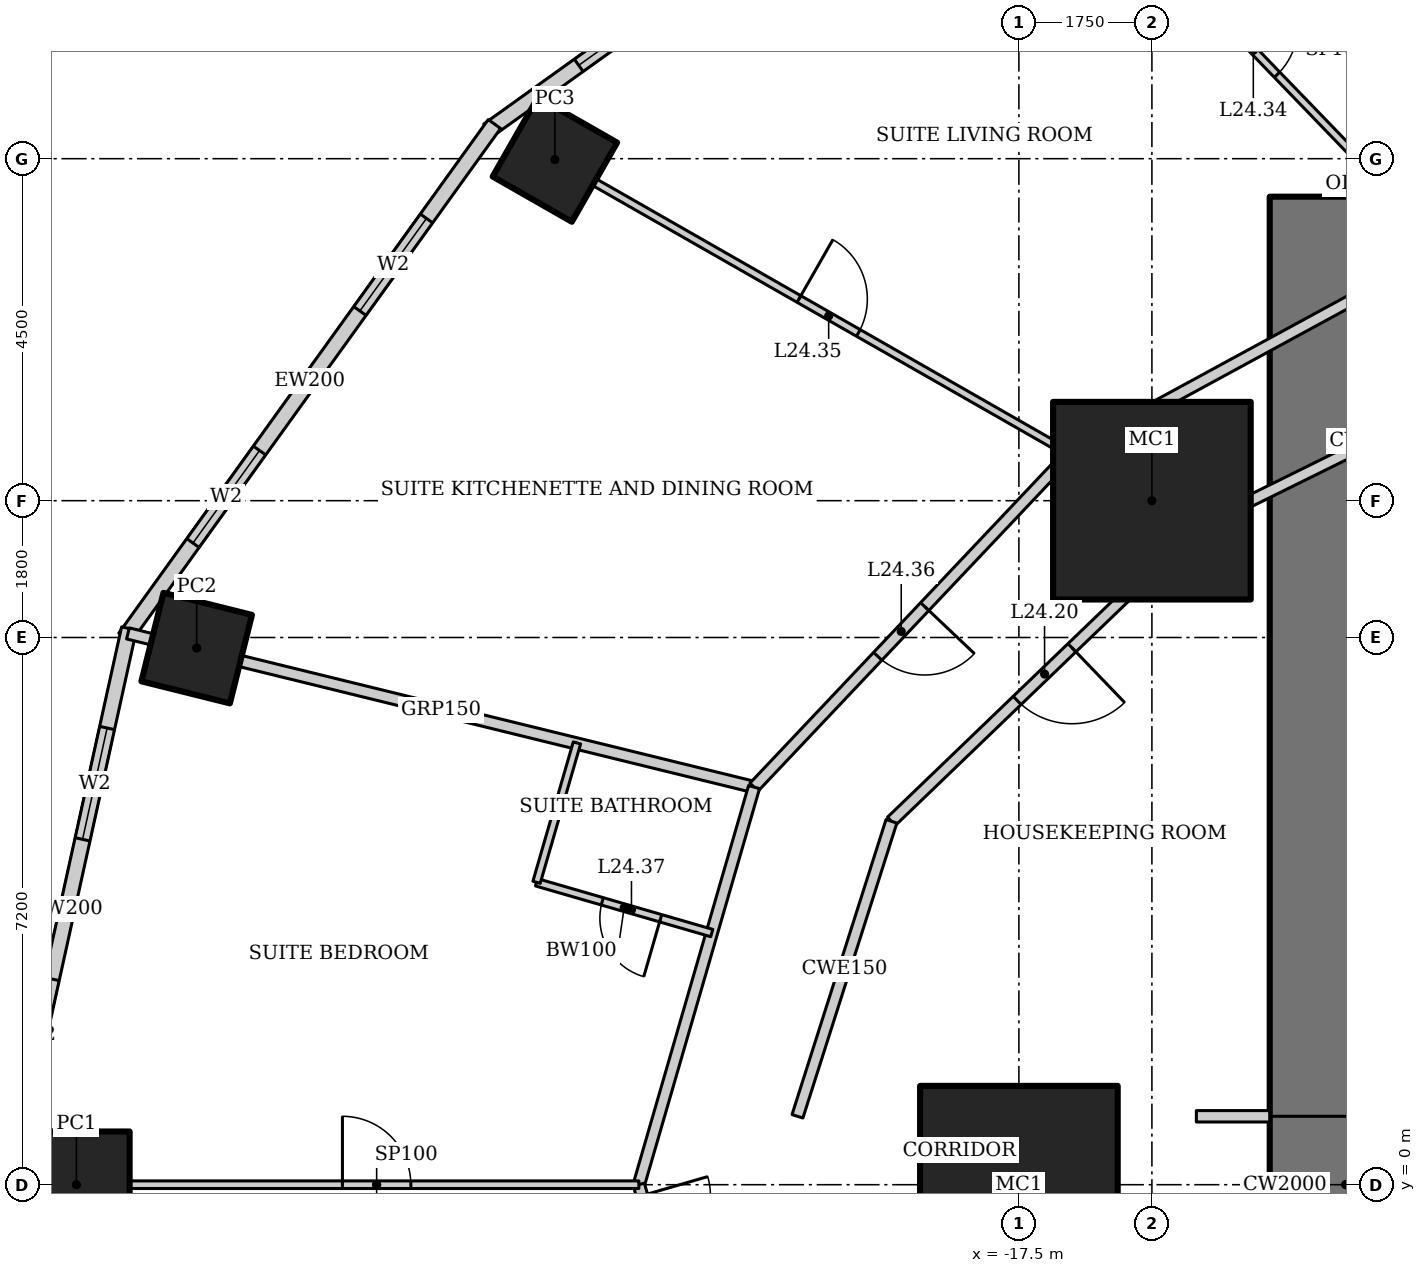
"""IFC4 building model, lengths in metres.
Left out: names, types, materials, properties, quantities, classifications, styles, units other than length and angle.
Written with IfcOpenShell. Run it as: python <this file> out.ifc"""

import sys

from ifc_helpers import new_model, si_unit, direction, frame, frame_2d, origin, origin_2d, place, context, subcontext, project, spatial, rectangle, hollow_rectangle, extrude, element, fill, save


model = new_model("IFC4")
c1 = context("Model", 3, precision=1e-05, world=origin(), true_north=direction((0.0, 1.0)))
c2 = subcontext(c1, "Body", "Model", "MODEL_VIEW")
j1 = project(units=[si_unit("LENGTHUNIT", "METRE"), si_unit("PLANEANGLEUNIT", "RADIAN")], contexts=[c1])
p1 = place(None, origin())
s1 = spatial("IfcSite", under=j1, at=p1, CompositionType="ELEMENT")
p2 = place(p1, origin())
s2 = spatial("IfcBuilding", under=s1, at=p2, CompositionType="ELEMENT")
p3 = place(p2, frame((0.0, 0.0, 101.8)))
s3 = spatial("IfcBuildingStorey", under=s2, at=p3, CompositionType="ELEMENT", Elevation=101.8)
for number, where, z_axis, x_axis in (
    (1, (-15.75, 9.0, 0.0), (0.0, 0.0, 1.0), (1.0, 0.0, 0.0)),
    (2, (-17.5, 0.0, 0.0), (0.0, 0.0, 1.0), (1.0, 0.0, 0.0)),
):
    element("IfcColumn", number, at=place(p3, frame(where, z_axis=z_axis, x_axis=x_axis)), inside=s3, PredefinedType="COLUMN", context=c2, shape_type="SweptSolid", body=[
        extrude(hollow_rectangle(XDim=2.6, YDim=2.6, WallThickness=0.13, at=origin_2d()), origin(), (0.0, 0.0, 1.0), 3.6),
    ])
p4 = place(p3, frame((-23.605, 13.489, 0.0), z_axis=(0.0, 0.0, 1.0), x_axis=(0.496139221777, 0.86824298017, 0.0)))
e3 = element("IfcColumn", 3, at=p4, inside=s3, PredefinedType="COLUMN", context=c2, shape_type="SweptSolid", body=[
    extrude(hollow_rectangle(XDim=1.2, YDim=1.2, WallThickness=0.12, at=origin_2d()), origin(), (0.0, 0.0, 1.0), 2.28),
])
p5 = place(p3, frame((-28.318, 7.06, 0.0), z_axis=(0.0, 0.0, 1.0), x_axis=(0.2419218956, 0.970295726276, 0.0)))
e4 = element("IfcColumn", 4, at=p5, inside=s3, PredefinedType="COLUMN", context=c2, shape_type="SweptSolid", body=[
    extrude(hollow_rectangle(XDim=1.2, YDim=1.2, WallThickness=0.1, at=origin_2d()), origin(), (0.0, 0.0, 1.0), 2.28),
])
p6 = place(p3, frame((-29.9, 0.0, 0.0), z_axis=(0.0, 0.0, 1.0), x_axis=(1.0, 0.0, 0.0)))
e5 = element("IfcColumn", 5, at=p6, inside=s3, PredefinedType="COLUMN", context=c2, shape_type="SweptSolid", body=[
    extrude(hollow_rectangle(XDim=1.4, YDim=1.4, WallThickness=0.1, at=origin_2d()), origin(), (0.0, 0.0, 1.0), 2.06),
])
p7 = place(p3, frame((-13.2, 13.0, 0.0), z_axis=(0.0, 0.0, 1.0), x_axis=(0.0, -1.0, 0.0)))
e6 = element("IfcWall", 6, at=p7, inside=s3, PredefinedType="SHEAR", context=c2, shape_type="SweptSolid", body=[
    extrude(rectangle(XDim=26.0, YDim=2.0, at=frame_2d((13.0, 0.0))), origin(), (0.0, 0.0, 1.0), 3.6),
])
p8 = place(p7, frame((12.1, 0.0, 0.0)))
e7 = element("IfcOpeningElement", 7, at=p8, cuts=e6, PredefinedType="OPENING", context=c2, shape_type="SweptSolid", body=[
    extrude(rectangle(XDim=1.8, YDim=2.1, at=frame_2d((0.9, 1.05))), frame((0.0, 1.01, 0.0), z_axis=(0.0, -1.0, 0.0), x_axis=(1.0, 0.0, 0.0)), (0.0, 0.0, 1.0), 2.02),
])
p9 = place(p3, frame((-17.929, 18.572, 0.0), z_axis=(0.0, 0.0, 1.0), x_axis=(-0.812791321576, -0.582554948112, 0.0)))
e8 = element("IfcWall", 8, at=p9, inside=s3, PredefinedType="SOLIDWALL", context=c2, shape_type="SweptSolid", body=[
    extrude(rectangle(XDim=8.063, YDim=0.2, at=frame_2d((4.032, 0.0))), origin(), (0.0, 0.0, 1.0), 3.4),
])
p10 = place(p9, frame((1.466, 0.0, 0.5)))
e9 = element("IfcOpeningElement", 9, at=p10, cuts=e8, PredefinedType="OPENING", context=c2, shape_type="SweptSolid", body=[
    extrude(rectangle(XDim=1.5, YDim=2.2, at=frame_2d((0.75, 1.1))), frame((0.0, 0.11, 0.0), z_axis=(0.0, -1.0, 0.0), x_axis=(1.0, 0.0, 0.0)), (0.0, 0.0, 1.0), 0.22),
])
p11 = place(p9, frame((5.097, 0.0, 0.5)))
e10 = element("IfcOpeningElement", 10, at=p11, cuts=e8, PredefinedType="OPENING", context=c2, shape_type="SweptSolid", body=[
    extrude(rectangle(XDim=1.5, YDim=2.2, at=frame_2d((0.75, 1.1))), frame((0.0, 0.11, 0.0), z_axis=(0.0, -1.0, 0.0), x_axis=(1.0, 0.0, 0.0)), (0.0, 0.0, 1.0), 0.22),
])
p12 = place(p3, frame((-24.4, 13.957, 0.0), z_axis=(0.0, 0.0, 1.0), x_axis=(-0.583937613703, -0.811798536155, 0.0)))
e11 = element("IfcWall", 11, at=p12, inside=s3, PredefinedType="SOLIDWALL", context=c2, shape_type="SweptSolid", body=[
    extrude(rectangle(XDim=8.323, YDim=0.2, at=frame_2d((4.162, 0.0))), origin(), (0.0, 0.0, 1.0), 3.4),
])
p13 = place(p12, frame((1.531, 0.0, 0.5)))
e12 = element("IfcOpeningElement", 12, at=p13, cuts=e11, PredefinedType="OPENING", context=c2, shape_type="SweptSolid", body=[
    extrude(rectangle(XDim=1.5, YDim=2.2, at=frame_2d((0.75, 1.1))), frame((0.0, 0.11, 0.0), z_axis=(0.0, -1.0, 0.0), x_axis=(1.0, 0.0, 0.0)), (0.0, 0.0, 1.0), 0.22),
])
p14 = place(p12, frame((5.292, 0.0, 0.5)))
e13 = element("IfcOpeningElement", 13, at=p14, cuts=e11, PredefinedType="OPENING", context=c2, shape_type="SweptSolid", body=[
    extrude(rectangle(XDim=1.5, YDim=2.2, at=frame_2d((0.75, 1.1))), frame((0.0, 0.11, 0.0), z_axis=(0.0, -1.0, 0.0), x_axis=(1.0, 0.0, 0.0)), (0.0, 0.0, 1.0), 0.22),
])
p15 = place(p3, frame((-29.208, 7.318, 0.0), z_axis=(0.0, 0.0, 1.0), x_axis=(-0.215238065514, -0.976561608478, 0.0)))
e14 = element("IfcWall", 14, at=p15, inside=s3, PredefinedType="SOLIDWALL", context=c2, shape_type="SweptSolid", body=[
    extrude(rectangle(XDim=7.562, YDim=0.2, at=frame_2d((3.781, 0.0))), origin(), (0.0, 0.0, 1.0), 3.4),
])
p16 = place(p15, frame((1.341, 0.0, 0.5)))
e15 = element("IfcOpeningElement", 15, at=p16, cuts=e14, PredefinedType="OPENING", context=c2, shape_type="SweptSolid", body=[
    extrude(rectangle(XDim=1.5, YDim=2.2, at=frame_2d((0.75, 1.1))), frame((0.0, 0.11, 0.0), z_axis=(0.0, -1.0, 0.0), x_axis=(1.0, 0.0, 0.0)), (0.0, 0.0, 1.0), 0.22),
])
p17 = place(p15, frame((4.722, 0.0, 0.5)))
e16 = element("IfcOpeningElement", 16, at=p17, cuts=e14, PredefinedType="OPENING", context=c2, shape_type="SweptSolid", body=[
    extrude(rectangle(XDim=1.5, YDim=2.2, at=frame_2d((0.75, 1.1))), frame((0.0, 0.11, 0.0), z_axis=(0.0, -1.0, 0.0), x_axis=(1.0, 0.0, 0.0)), (0.0, 0.0, 1.0), 0.22),
])
p18 = place(p3, frame((-30.835, 0.067, 0.0), z_axis=(0.0, 0.0, 1.0), x_axis=(0.215238065514, -0.976561608478, 0.0)))
e17 = element("IfcWall", 17, at=p18, inside=s3, PredefinedType="SOLIDWALL", context=c2, shape_type="SweptSolid", body=[
    extrude(rectangle(XDim=7.562, YDim=0.2, at=frame_2d((3.781, 0.0))), origin(), (0.0, 0.0, 1.0), 3.4),
])
p19 = place(p18, frame((1.341, 0.0, 0.5)))
e18 = element("IfcOpeningElement", 18, at=p19, cuts=e17, PredefinedType="OPENING", context=c2, shape_type="SweptSolid", body=[
    extrude(rectangle(XDim=1.5, YDim=2.2, at=frame_2d((0.75, 1.1))), frame((0.0, 0.11, 0.0), z_axis=(0.0, -1.0, 0.0), x_axis=(1.0, 0.0, 0.0)), (0.0, 0.0, 1.0), 0.22),
])
p20 = place(p18, frame((4.722, 0.0, 0.5)))
e19 = element("IfcOpeningElement", 19, at=p20, cuts=e17, PredefinedType="OPENING", context=c2, shape_type="SweptSolid", body=[
    extrude(rectangle(XDim=1.5, YDim=2.2, at=frame_2d((0.75, 1.1))), frame((0.0, 0.11, 0.0), z_axis=(0.0, -1.0, 0.0), x_axis=(1.0, 0.0, 0.0)), (0.0, 0.0, 1.0), 0.22),
])
p21 = place(p3, frame((-29.222, 7.254, 0.0), z_axis=(0.0, 0.0, 1.0), x_axis=(0.971178166182, -0.238354713676, 0.0)))
e20 = element("IfcWall", 20, at=p21, inside=s3, PredefinedType="PARTITIONING", context=c2, shape_type="SweptSolid", body=[
    extrude(rectangle(XDim=8.482, YDim=0.15, at=frame_2d((4.241, 0.0))), origin(), (0.0, 0.0, 1.0), 1.9),
])
p22 = place(p3, frame((-11.888, 12.311, 0.0), z_axis=(0.0, 0.0, 1.0), x_axis=(-0.878450059298, -0.477834169267, 0.0)))
e21 = element("IfcWall", 21, at=p22, inside=s3, PredefinedType="PARTITIONING", context=c2, shape_type="SweptSolid", body=[
    extrude(rectangle(XDim=5.631, YDim=0.15, at=frame_2d((2.815, 0.0))), origin(), (0.0, 0.0, 1.0), 3.4),
])
p23 = place(p3, frame((-16.835, 9.62, 0.0), z_axis=(0.0, 0.0, 1.0), x_axis=(-0.687062608696, -0.726598218916, 0.0)))
e22 = element("IfcWall", 22, at=p23, inside=s3, PredefinedType="PARTITIONING", context=c2, shape_type="SweptSolid", body=[
    extrude(rectangle(XDim=6.039, YDim=0.15, at=frame_2d((3.02, 0.0))), origin(), (0.0, 0.0, 1.0), 3.4),
])
p24 = place(p23, frame((2.771, 0.0, 0.0)))
e23 = element("IfcOpeningElement", 23, at=p24, cuts=e22, PredefinedType="OPENING", context=c2, shape_type="SweptSolid", body=[
    extrude(rectangle(XDim=0.9, YDim=2.1, at=frame_2d((0.45, 1.05))), frame((0.0, 0.085, 0.0), z_axis=(0.0, -1.0, 0.0), x_axis=(1.0, 0.0, 0.0)), (0.0, 0.0, 1.0), 0.17),
])
p25 = place(p3, frame((-20.984, 5.232, 0.0), z_axis=(0.0, 0.0, 1.0), x_axis=(-0.278247435376, -0.960509429785, 0.0)))
e24 = element("IfcWall", 24, at=p25, inside=s3, PredefinedType="PARTITIONING", context=c2, shape_type="SweptSolid", body=[
    extrude(rectangle(XDim=5.447, YDim=0.15, at=frame_2d((2.724, 0.0))), origin(), (0.0, 0.0, 1.0), 3.4),
])
p26 = place(p3, frame((-22.5, 0.0, 0.0), z_axis=(0.0, 0.0, 1.0), x_axis=(0.278247435376, -0.960509429785, 0.0)))
e25 = element("IfcWall", 25, at=p26, inside=s3, PredefinedType="PARTITIONING", context=c2, shape_type="SweptSolid", body=[
    extrude(rectangle(XDim=5.447, YDim=0.15, at=frame_2d((2.724, 0.0))), origin(), (0.0, 0.0, 1.0), 3.4),
])
p27 = place(p26, frame((0.15, 0.0, 0.0)))
e26 = element("IfcOpeningElement", 26, at=p27, cuts=e25, PredefinedType="OPENING", context=c2, shape_type="SweptSolid", body=[
    extrude(rectangle(XDim=0.9, YDim=2.1, at=frame_2d((0.45, 1.05))), frame((0.0, 0.085, 0.0), z_axis=(0.0, -1.0, 0.0), x_axis=(1.0, 0.0, 0.0)), (0.0, 0.0, 1.0), 0.17),
])
p28 = place(p3, frame((-10.551, 10.926, 0.0), z_axis=(0.0, 0.0, 1.0), x_axis=(-0.89656943448, -0.442903205177, 0.0)))
e27 = element("IfcWall", 27, at=p28, inside=s3, PredefinedType="PARTITIONING", context=c2, shape_type="SweptSolid", body=[
    extrude(rectangle(XDim=5.126, YDim=0.15, at=frame_2d((2.563, 0.0))), origin(), (0.0, 0.0, 1.0), 3.4),
])
p29 = place(p3, frame((-15.147, 8.656, 0.0), z_axis=(0.0, 0.0, 1.0), x_axis=(-0.720837261072, -0.693104352209, 0.0)))
e28 = element("IfcWall", 28, at=p29, inside=s3, PredefinedType="PARTITIONING", context=c2, shape_type="SweptSolid", body=[
    extrude(rectangle(XDim=5.59, YDim=0.15, at=frame_2d((2.795, 0.0))), origin(), (0.0, 0.0, 1.0), 3.4),
])
p30 = place(p29, frame((2.295, 0.0, 0.0)))
e29 = element("IfcOpeningElement", 29, at=p30, cuts=e28, PredefinedType="OPENING", context=c2, shape_type="SweptSolid", body=[
    extrude(rectangle(XDim=1.0, YDim=2.1, at=frame_2d((0.5, 1.05))), frame((0.0, 0.085, 0.0), z_axis=(0.0, -1.0, 0.0), x_axis=(1.0, 0.0, 0.0)), (0.0, 0.0, 1.0), 0.17),
])
p31 = place(p3, frame((-19.177, 4.781, 0.0), z_axis=(0.0, 0.0, 1.0), x_axis=(-0.303505448228, -0.952829702988, 0.0)))
e30 = element("IfcWall", 30, at=p31, inside=s3, PredefinedType="PARTITIONING", context=c2, shape_type="SweptSolid", body=[
    extrude(rectangle(XDim=4.073, YDim=0.15, at=frame_2d((2.037, 0.0))), origin(), (0.0, 0.0, 1.0), 3.4),
])
p32 = place(p3, frame((-16.944, 17.545, 0.0), z_axis=(0.0, 0.0, 1.0), x_axis=(0.694669949151, -0.719328618746, 0.0)))
e31 = element("IfcWall", 31, at=p32, inside=s3, PredefinedType="PARTITIONING", context=c2, shape_type="SweptSolid", body=[
    extrude(rectangle(XDim=7.277, YDim=0.1, at=frame_2d((3.639, 0.0))), origin(), (0.0, 0.0, 1.0), 2.463),
])
p33 = place(p32, frame((3.189, 0.0, 0.0)))
e32 = element("IfcOpeningElement", 32, at=p33, cuts=e31, PredefinedType="OPENING", context=c2, shape_type="SweptSolid", body=[
    extrude(rectangle(XDim=0.9, YDim=2.1, at=frame_2d((0.45, 1.05))), frame((0.0, 0.06, 0.0), z_axis=(0.0, -1.0, 0.0), x_axis=(1.0, 0.0, 0.0)), (0.0, 0.0, 1.0), 0.12),
])
p34 = place(p3, frame((-23.171, 13.24, 0.0), z_axis=(0.0, 0.0, 1.0), x_axis=(0.868253436131, -0.496120923412, 0.0)))
e33 = element("IfcWall", 33, at=p34, inside=s3, PredefinedType="PARTITIONING", context=c2, shape_type="SweptSolid", body=[
    extrude(rectangle(XDim=7.297, YDim=0.1, at=frame_2d((3.649, 0.0))), origin(), (0.0, 0.0, 1.0), 2.2),
])
p35 = place(p34, frame((3.198, 0.0, 0.0)))
e34 = element("IfcOpeningElement", 34, at=p35, cuts=e33, PredefinedType="OPENING", context=c2, shape_type="SweptSolid", body=[
    extrude(rectangle(XDim=0.9, YDim=2.1, at=frame_2d((0.45, 1.05))), frame((0.0, 0.06, 0.0), z_axis=(0.0, -1.0, 0.0), x_axis=(1.0, 0.0, 0.0)), (0.0, 0.0, 1.0), 0.12),
])
p36 = place(p3, frame((-21.541, 3.311, 0.0), z_axis=(0.0, 0.0, 1.0), x_axis=(-0.960515628303, 0.278226037218, 0.0)))
e35 = element("IfcWall", 35, at=p36, inside=s3, PredefinedType="PARTITIONING", context=c2, shape_type="SweptSolid", body=[
    extrude(rectangle(XDim=2.4, YDim=0.1, at=frame_2d((1.2, 0.0))), origin(), (0.0, 0.0, 1.0), 3.4),
])
p37 = place(p36, frame((0.7, 0.0, 0.0)))
e36 = element("IfcOpeningElement", 36, at=p37, cuts=e35, PredefinedType="OPENING", context=c2, shape_type="SweptSolid", body=[
    extrude(rectangle(XDim=0.8, YDim=2.1, at=frame_2d((0.4, 1.05))), frame((0.0, 0.06, 0.0), z_axis=(0.0, -1.0, 0.0), x_axis=(1.0, 0.0, 0.0)), (0.0, 0.0, 1.0), 0.12),
])
p38 = place(p3, frame((-23.846, 3.979, 0.0), z_axis=(0.0, 0.0, 1.0), x_axis=(0.278197767203, 0.960523816635, 0.0)))
e37 = element("IfcWall", 37, at=p38, inside=s3, PredefinedType="PARTITIONING", context=c2, shape_type="SweptSolid", body=[
    extrude(rectangle(XDim=1.91, YDim=0.1, at=frame_2d((0.955, 0.0))), origin(), (0.0, 0.0, 1.0), 3.4),
])
p39 = place(p3, frame((-29.4, 0.0, 0.0), z_axis=(0.0, 0.0, 1.0), x_axis=(1.0, 0.0, 0.0)))
e38 = element("IfcWall", 38, at=p39, inside=s3, PredefinedType="PARTITIONING", context=c2, shape_type="SweptSolid", body=[
    extrude(rectangle(XDim=6.9, YDim=0.1, at=frame_2d((3.45, 0.0))), origin(), (0.0, 0.0, 1.0), 2.2),
])
p40 = place(p39, frame((3.0, 0.0, 0.0)))
e39 = element("IfcOpeningElement", 39, at=p40, cuts=e38, PredefinedType="OPENING", context=c2, shape_type="SweptSolid", body=[
    extrude(rectangle(XDim=0.9, YDim=2.1, at=frame_2d((0.45, 1.05))), frame((0.0, 0.06, 0.0), z_axis=(0.0, -1.0, 0.0), x_axis=(1.0, 0.0, 0.0)), (0.0, 0.0, 1.0), 0.12),
])
p41 = place(p3, frame((-13.2, 13.0, 0.0), z_axis=(0.0, 0.0, 1.0), x_axis=(0.719347134512, 0.69465077562, 0.0)))
e40 = element("IfcWall", 40, at=p41, inside=s3, PredefinedType="PARTITIONING", context=c2, shape_type="SweptSolid", body=[
    extrude(rectangle(XDim=0.465, YDim=0.1, at=frame_2d((0.232, 0.0))), origin(), (0.0, 0.0, 1.0), 3.4),
])
p42 = place(p3, frame((-14.2, 0.9, 0.0), z_axis=(0.0, 0.0, 1.0), x_axis=(-1.0, 0.0, 0.0)))
e41 = element("IfcWall", 41, at=p42, inside=s3, PredefinedType="PARTITIONING", context=c2, shape_type="SweptSolid", body=[
    extrude(rectangle(XDim=0.965, YDim=0.15, at=frame_2d((0.482, 0.0))), origin(), (0.0, 0.0, 1.0), 3.4),
])
p43 = place(p11, origin())
e42 = element("IfcWindow", 42, at=p43, inside=s3, PartitioningType="SINGLE_PANEL", PredefinedType="WINDOW", context=c2, shape_type="SweptSolid", body=[
    extrude(rectangle(XDim=1.5, YDim=2.2, at=frame_2d((0.75, 1.1))), frame((0.0, 0.03, 0.0), z_axis=(0.0, -1.0, 0.0), x_axis=(1.0, 0.0, 0.0)), (0.0, 0.0, 1.0), 0.06),
])
fill(e10, e42)
p44 = place(p13, origin())
e43 = element("IfcWindow", 43, at=p44, inside=s3, PartitioningType="SINGLE_PANEL", PredefinedType="WINDOW", context=c2, shape_type="SweptSolid", body=[
    extrude(rectangle(XDim=1.5, YDim=2.2, at=frame_2d((0.75, 1.1))), frame((0.0, 0.03, 0.0), z_axis=(0.0, -1.0, 0.0), x_axis=(1.0, 0.0, 0.0)), (0.0, 0.0, 1.0), 0.06),
])
fill(e12, e43)
p45 = place(p14, origin())
e44 = element("IfcWindow", 44, at=p45, inside=s3, PartitioningType="SINGLE_PANEL", PredefinedType="WINDOW", context=c2, shape_type="SweptSolid", body=[
    extrude(rectangle(XDim=1.5, YDim=2.2, at=frame_2d((0.75, 1.1))), frame((0.0, 0.03, 0.0), z_axis=(0.0, -1.0, 0.0), x_axis=(1.0, 0.0, 0.0)), (0.0, 0.0, 1.0), 0.06),
])
fill(e13, e44)
p46 = place(p16, origin())
e45 = element("IfcWindow", 45, at=p46, inside=s3, PartitioningType="SINGLE_PANEL", PredefinedType="WINDOW", context=c2, shape_type="SweptSolid", body=[
    extrude(rectangle(XDim=1.5, YDim=2.2, at=frame_2d((0.75, 1.1))), frame((0.0, 0.03, 0.0), z_axis=(0.0, -1.0, 0.0), x_axis=(1.0, 0.0, 0.0)), (0.0, 0.0, 1.0), 0.06),
])
fill(e15, e45)
p47 = place(p17, origin())
e46 = element("IfcWindow", 46, at=p47, inside=s3, PartitioningType="SINGLE_PANEL", PredefinedType="WINDOW", context=c2, shape_type="SweptSolid", body=[
    extrude(rectangle(XDim=1.5, YDim=2.2, at=frame_2d((0.75, 1.1))), frame((0.0, 0.03, 0.0), z_axis=(0.0, -1.0, 0.0), x_axis=(1.0, 0.0, 0.0)), (0.0, 0.0, 1.0), 0.06),
])
fill(e16, e46)
p48 = place(p8, origin())
e47 = element("IfcDoor", 47, at=p48, inside=s3, OperationType="DOUBLE_DOOR_DOUBLE_SWING", PredefinedType="DOOR", context=c2, shape_type="SweptSolid", body=[
    extrude(rectangle(XDim=1.8, YDim=2.1, at=frame_2d((0.9, 1.05))), frame((0.0, 0.025, 0.0), z_axis=(0.0, -1.0, 0.0), x_axis=(1.0, 0.0, 0.0)), (0.0, 0.0, 1.0), 0.05),
])
fill(e7, e47)
p49 = place(p30, origin())
e48 = element("IfcDoor", 48, at=p49, inside=s3, OperationType="SINGLE_SWING_LEFT", PredefinedType="DOOR", context=c2, shape_type="SweptSolid", body=[
    extrude(rectangle(XDim=1.0, YDim=2.1, at=frame_2d((0.5, 1.05))), frame((0.0, 0.025, 0.0), z_axis=(0.0, -1.0, 0.0), x_axis=(1.0, 0.0, 0.0)), (0.0, 0.0, 1.0), 0.05),
])
fill(e29, e48)
p50 = place(p33, origin())
e49 = element("IfcDoor", 49, at=p50, inside=s3, OperationType="SINGLE_SWING_LEFT", PredefinedType="DOOR", context=c2, shape_type="SweptSolid", body=[
    extrude(rectangle(XDim=0.9, YDim=2.1, at=frame_2d((0.45, 1.05))), frame((0.0, 0.025, 0.0), z_axis=(0.0, -1.0, 0.0), x_axis=(1.0, 0.0, 0.0)), (0.0, 0.0, 1.0), 0.05),
])
fill(e32, e49)
p51 = place(p35, origin())
e50 = element("IfcDoor", 50, at=p51, inside=s3, OperationType="SINGLE_SWING_LEFT", PredefinedType="DOOR", context=c2, shape_type="SweptSolid", body=[
    extrude(rectangle(XDim=0.9, YDim=2.1, at=frame_2d((0.45, 1.05))), frame((0.0, 0.025, 0.0), z_axis=(0.0, -1.0, 0.0), x_axis=(1.0, 0.0, 0.0)), (0.0, 0.0, 1.0), 0.05),
])
fill(e34, e50)
p52 = place(p24, origin())
e51 = element("IfcDoor", 51, at=p52, inside=s3, OperationType="SINGLE_SWING_LEFT", PredefinedType="DOOR", context=c2, shape_type="SweptSolid", body=[
    extrude(rectangle(XDim=0.9, YDim=2.1, at=frame_2d((0.45, 1.05))), frame((0.0, 0.025, 0.0), z_axis=(0.0, -1.0, 0.0), x_axis=(1.0, 0.0, 0.0)), (0.0, 0.0, 1.0), 0.05),
])
fill(e23, e51)
p53 = place(p37, origin())
e52 = element("IfcDoor", 52, at=p53, inside=s3, OperationType="SINGLE_SWING_LEFT", PredefinedType="DOOR", context=c2, shape_type="SweptSolid", body=[
    extrude(rectangle(XDim=0.8, YDim=2.1, at=frame_2d((0.4, 1.05))), frame((0.0, 0.025, 0.0), z_axis=(0.0, -1.0, 0.0), x_axis=(1.0, 0.0, 0.0)), (0.0, 0.0, 1.0), 0.05),
])
fill(e36, e52)
p54 = place(p40, origin())
e53 = element("IfcDoor", 53, at=p54, inside=s3, OperationType="SINGLE_SWING_LEFT", PredefinedType="DOOR", context=c2, shape_type="SweptSolid", body=[
    extrude(rectangle(XDim=0.9, YDim=2.1, at=frame_2d((0.45, 1.05))), frame((0.0, 0.025, 0.0), z_axis=(0.0, -1.0, 0.0), x_axis=(1.0, 0.0, 0.0)), (0.0, 0.0, 1.0), 0.05),
])
fill(e39, e53)
save(model, sys.argv[1])
